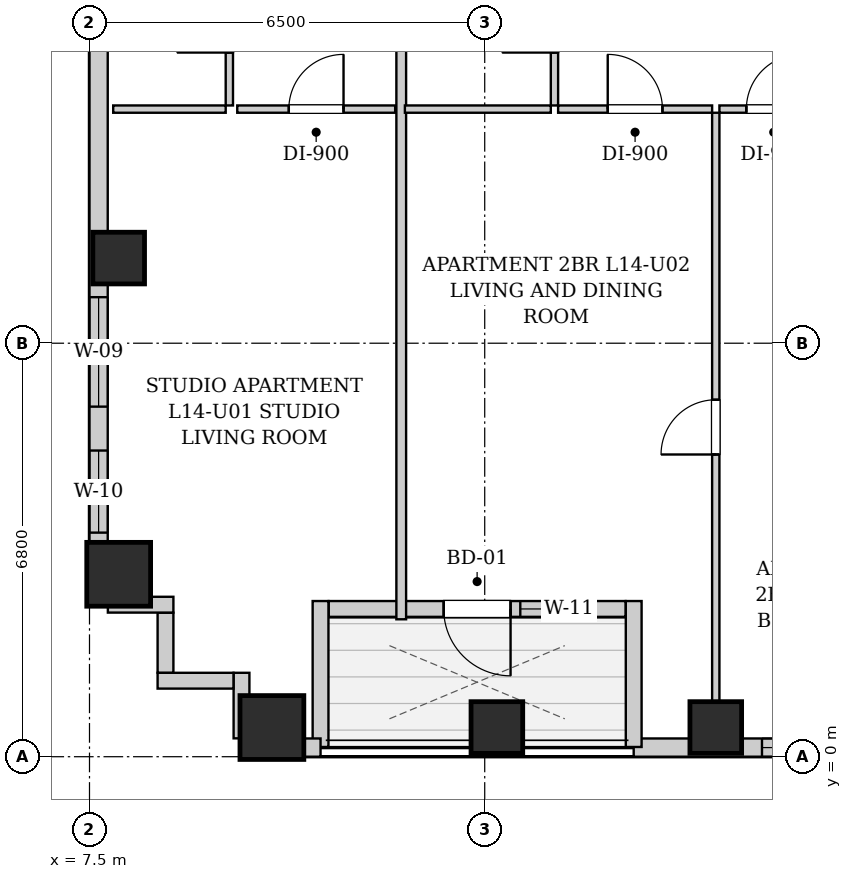
"""IFC4 building model, lengths in metres.
Left out: names, types, materials, properties, quantities, classifications, styles, units other than length and angle.
Written with IfcOpenShell. Run it as: python <this file> out.ifc"""

import sys

from ifc_helpers import new_model, si_unit, direction, frame, frame_2d, origin, origin_2d, place, context, subcontext, project, spatial, rectangle, extrude, element, fill, save


model = new_model("IFC4")
c1 = context("Model", 3, precision=1e-05, world=origin(), true_north=direction((0.0, 1.0)))
c2 = subcontext(c1, "Body", "Model", "MODEL_VIEW")
j1 = project(units=[si_unit("LENGTHUNIT", "METRE"), si_unit("PLANEANGLEUNIT", "RADIAN")], contexts=[c1])
p1 = place(None, origin())
s1 = spatial("IfcSite", under=j1, at=p1, CompositionType="ELEMENT")
p2 = place(p1, origin())
s2 = spatial("IfcBuilding", under=s1, at=p2, CompositionType="ELEMENT")
p3 = place(p2, frame((0.0, 0.0, 54.6)))
s3 = spatial("IfcBuildingStorey", under=s2, at=p3, CompositionType="ELEMENT", Elevation=54.6)
p4 = place(p3, frame((10.5, 0.48, 0.0), z_axis=(0.0, 0.0, 1.0), x_axis=(1.0, 0.0, 0.0)))
e1 = element("IfcColumn", 1, at=p4, inside=s3, PredefinedType="COLUMN", context=c2, shape_type="SweptSolid", body=[
    extrude(rectangle(XDim=1.05, YDim=1.05, at=origin_2d()), origin(), (0.0, 0.0, 1.0), 3.2),
])
for number, where, z_axis, x_axis in (
    (2, (14.2, 0.48, 0.0), (0.0, 0.0, 1.0), (1.0, 0.0, 0.0)),
    (3, (17.8, 0.48, 0.0), (0.0, 0.0, 1.0), (1.0, 0.0, 0.0)),
):
    element("IfcColumn", number, at=place(p3, frame(where, z_axis=z_axis, x_axis=x_axis)), inside=s3, PredefinedType="COLUMN", context=c2, shape_type="SweptSolid", body=[
        extrude(rectangle(XDim=0.85, YDim=0.85, at=origin_2d()), origin(), (0.0, 0.0, 1.0), 3.2),
    ])
p5 = place(p3, frame((7.98, 3.0, 0.0), z_axis=(0.0, 0.0, 1.0), x_axis=(1.0, 0.0, 0.0)))
e4 = element("IfcColumn", 4, at=p5, inside=s3, PredefinedType="COLUMN", context=c2, shape_type="SweptSolid", body=[
    extrude(rectangle(XDim=1.05, YDim=1.05, at=origin_2d()), origin(), (0.0, 0.0, 1.0), 3.2),
])
p6 = place(p3, frame((7.98, 8.2, 0.0), z_axis=(0.0, 0.0, 1.0), x_axis=(1.0, 0.0, 0.0)))
e5 = element("IfcColumn", 5, at=p6, inside=s3, PredefinedType="COLUMN", context=c2, shape_type="SweptSolid", body=[
    extrude(rectangle(XDim=0.85, YDim=0.85, at=origin_2d()), origin(), (0.0, 0.0, 1.0), 3.2),
])
p7 = place(p3, frame((44.0, 0.15, 0.0), z_axis=(0.0, 0.0, 1.0), x_axis=(-1.0, 0.0, 0.0)))
e6 = element("IfcWall", 6, at=p7, inside=s3, PredefinedType="SOLIDWALL", context=c2, shape_type="SweptSolid", body=[
    extrude(rectangle(XDim=27.55, YDim=0.3, at=frame_2d((13.775, 0.0))), origin(), (0.0, 0.0, 1.0), 1.975),
])
p8 = place(p7, frame((23.64, 0.0, 0.55)))
e7 = element("IfcOpeningElement", 7, at=p8, cuts=e6, PredefinedType="OPENING", context=c2, shape_type="SweptSolid", body=[
    extrude(rectangle(XDim=1.8, YDim=1.2, at=frame_2d((0.9, 0.6))), frame((0.0, 0.16, 0.0), z_axis=(0.0, -1.0, 0.0), x_axis=(1.0, 0.0, 0.0)), (0.0, 0.0, 1.0), 0.32),
])
p9 = place(p7, frame((21.5, 0.0, 0.55)))
e8 = element("IfcOpeningElement", 8, at=p9, cuts=e6, PredefinedType="OPENING", context=c2, shape_type="SweptSolid", body=[
    extrude(rectangle(XDim=0.85, YDim=1.2, at=frame_2d((0.425, 0.6))), frame((0.0, 0.16, 0.0), z_axis=(0.0, -1.0, 0.0), x_axis=(1.0, 0.0, 0.0)), (0.0, 0.0, 1.0), 0.32),
])
p10 = place(p7, frame((15.65, 0.0, 0.55)))
e9 = element("IfcOpeningElement", 9, at=p10, cuts=e6, PredefinedType="OPENING", context=c2, shape_type="SweptSolid", body=[
    extrude(rectangle(XDim=0.85, YDim=1.2, at=frame_2d((0.425, 0.6))), frame((0.0, 0.16, 0.0), z_axis=(0.0, -1.0, 0.0), x_axis=(1.0, 0.0, 0.0)), (0.0, 0.0, 1.0), 0.32),
])
p11 = place(p7, frame((12.875, 0.0, 0.55)))
e10 = element("IfcOpeningElement", 10, at=p11, cuts=e6, PredefinedType="OPENING", context=c2, shape_type="SweptSolid", body=[
    extrude(rectangle(XDim=1.8, YDim=1.2, at=frame_2d((0.9, 0.6))), frame((0.0, 0.16, 0.0), z_axis=(0.0, -1.0, 0.0), x_axis=(1.0, 0.0, 0.0)), (0.0, 0.0, 1.0), 0.32),
])
p12 = place(p7, frame((9.365, 0.0, 0.55)))
e11 = element("IfcOpeningElement", 11, at=p12, cuts=e6, PredefinedType="OPENING", context=c2, shape_type="SweptSolid", body=[
    extrude(rectangle(XDim=0.85, YDim=1.2, at=frame_2d((0.425, 0.6))), frame((0.0, 0.16, 0.0), z_axis=(0.0, -1.0, 0.0), x_axis=(1.0, 0.0, 0.0)), (0.0, 0.0, 1.0), 0.32),
])
p13 = place(p7, frame((6.477, 0.0, 0.55)))
e12 = element("IfcOpeningElement", 12, at=p13, cuts=e6, PredefinedType="OPENING", context=c2, shape_type="SweptSolid", body=[
    extrude(rectangle(XDim=1.8, YDim=1.2, at=frame_2d((0.9, 0.6))), frame((0.0, 0.16, 0.0), z_axis=(0.0, -1.0, 0.0), x_axis=(1.0, 0.0, 0.0)), (0.0, 0.0, 1.0), 0.32),
])
p14 = place(p7, frame((2.186, 0.0, 0.55)))
e13 = element("IfcOpeningElement", 13, at=p14, cuts=e6, PredefinedType="OPENING", context=c2, shape_type="SweptSolid", body=[
    extrude(rectangle(XDim=1.8, YDim=1.2, at=frame_2d((0.9, 0.6))), frame((0.0, 0.16, 0.0), z_axis=(0.0, -1.0, 0.0), x_axis=(1.0, 0.0, 0.0)), (0.0, 0.0, 1.0), 0.32),
])
p15 = place(p3, frame((16.45, 0.16, 0.0), z_axis=(0.0, 0.0, 1.0), x_axis=(0.0, 1.0, 0.0)))
e14 = element("IfcWall", 14, at=p15, inside=s3, PredefinedType="SOLIDWALL", context=c2, shape_type="SweptSolid", body=[
    extrude(rectangle(XDim=2.4, YDim=0.26, at=frame_2d((1.2, 0.0))), origin(), (0.0, 0.0, 1.0), 2.94),
])
p16 = place(p3, frame((16.316, 2.43, 0.0), z_axis=(0.0, 0.0, 1.0), x_axis=(-1.0, 0.0, 0.0)))
e15 = element("IfcWall", 15, at=p16, inside=s3, PredefinedType="SOLIDWALL", context=c2, shape_type="SweptSolid", body=[
    extrude(rectangle(XDim=4.882, YDim=0.26, at=frame_2d((2.441, 0.0))), origin(), (0.0, 0.0, 1.0), 2.94),
])
p17 = place(p16, frame((1.891, 0.0, 0.0)))
e16 = element("IfcOpeningElement", 16, at=p17, cuts=e15, PredefinedType="OPENING", context=c2, shape_type="SweptSolid", body=[
    extrude(rectangle(XDim=1.1, YDim=2.0, at=frame_2d((0.55, 1.0))), frame((0.0, 0.14, 0.0), z_axis=(0.0, -1.0, 0.0), x_axis=(1.0, 0.0, 0.0)), (0.0, 0.0, 1.0), 0.28),
])
p18 = place(p16, frame((0.881, 0.0, 0.55)))
e17 = element("IfcOpeningElement", 17, at=p18, cuts=e15, PredefinedType="OPENING", context=c2, shape_type="SweptSolid", body=[
    extrude(rectangle(XDim=0.85, YDim=1.2, at=frame_2d((0.425, 0.6))), frame((0.0, 0.14, 0.0), z_axis=(0.0, -1.0, 0.0), x_axis=(1.0, 0.0, 0.0)), (0.0, 0.0, 1.0), 0.28),
])
p19 = place(p3, frame((11.3, 2.56, 0.0), z_axis=(0.0, 0.0, 1.0), x_axis=(0.0, -1.0, 0.0)))
e18 = element("IfcWall", 18, at=p19, inside=s3, PredefinedType="SOLIDWALL", context=c2, shape_type="SweptSolid", body=[
    extrude(rectangle(XDim=2.4, YDim=0.26, at=frame_2d((1.2, 0.0))), origin(), (0.0, 0.0, 1.0), 2.94),
])
p20 = place(p3, frame((11.3, 0.15, 0.0), z_axis=(0.0, 0.0, 1.0), x_axis=(-1.0, 0.0, 0.0)))
e19 = element("IfcWall", 19, at=p20, inside=s3, PredefinedType="SOLIDWALL", context=c2, shape_type="SweptSolid", body=[
    extrude(rectangle(XDim=1.3, YDim=0.3, at=frame_2d((0.65, 0.0))), origin(), (0.0, 0.0, 1.0), 1.975),
])
p21 = place(p3, frame((7.65, 2.5, 0.0), z_axis=(0.0, 0.0, 1.0), x_axis=(0.0, 1.0, 0.0)))
e20 = element("IfcWall", 20, at=p21, inside=s3, PredefinedType="SOLIDWALL", context=c2, shape_type="SweptSolid", body=[
    extrude(rectangle(XDim=12.7, YDim=0.3, at=frame_2d((6.35, 0.0))), origin(), (0.0, 0.0, 1.0), 1.975),
])
p22 = place(p21, frame((3.257, 0.0, 0.55)))
e21 = element("IfcOpeningElement", 21, at=p22, cuts=e20, PredefinedType="OPENING", context=c2, shape_type="SweptSolid", body=[
    extrude(rectangle(XDim=1.8, YDim=1.2, at=frame_2d((0.9, 0.6))), frame((0.0, 0.16, 0.0), z_axis=(0.0, -1.0, 0.0), x_axis=(1.0, 0.0, 0.0)), (0.0, 0.0, 1.0), 0.32),
])
p23 = place(p21, frame((1.185, 0.0, 0.55)))
e22 = element("IfcOpeningElement", 22, at=p23, cuts=e20, PredefinedType="OPENING", context=c2, shape_type="SweptSolid", body=[
    extrude(rectangle(XDim=1.35, YDim=1.2, at=frame_2d((0.675, 0.6))), frame((0.0, 0.16, 0.0), z_axis=(0.0, -1.0, 0.0), x_axis=(1.0, 0.0, 0.0)), (0.0, 0.0, 1.0), 0.32),
])
p24 = place(p3, frame((10.0, 0.302, 0.0), z_axis=(0.0, 0.0, 1.0), x_axis=(0.0, 1.0, 0.0)))
e23 = element("IfcWall", 23, at=p24, inside=s3, PredefinedType="SOLIDWALL", context=c2, shape_type="SweptSolid", body=[
    extrude(rectangle(XDim=1.078, YDim=0.26, at=frame_2d((0.539, 0.0))), origin(), (0.0, 0.0, 1.0), 2.94),
])
p25 = place(p3, frame((9.868, 1.25, 0.0), z_axis=(0.0, 0.0, 1.0), x_axis=(-1.0, 0.0, 0.0)))
e24 = element("IfcWall", 24, at=p25, inside=s3, PredefinedType="SOLIDWALL", context=c2, shape_type="SweptSolid", body=[
    extrude(rectangle(XDim=1.248, YDim=0.26, at=frame_2d((0.624, 0.0))), origin(), (0.0, 0.0, 1.0), 2.94),
])
p26 = place(p3, frame((8.75, 1.382, 0.0), z_axis=(0.0, 0.0, 1.0), x_axis=(0.0, 1.0, 0.0)))
e25 = element("IfcWall", 25, at=p26, inside=s3, PredefinedType="SOLIDWALL", context=c2, shape_type="SweptSolid", body=[
    extrude(rectangle(XDim=0.986, YDim=0.26, at=frame_2d((0.493, 0.0))), origin(), (0.0, 0.0, 1.0), 2.94),
])
p27 = place(p3, frame((8.88, 2.5, 0.0), z_axis=(0.0, 0.0, 1.0), x_axis=(-1.0, 0.0, 0.0)))
e26 = element("IfcWall", 26, at=p27, inside=s3, PredefinedType="SOLIDWALL", context=c2, shape_type="SweptSolid", body=[
    extrude(rectangle(XDim=1.078, YDim=0.26, at=frame_2d((0.539, 0.0))), origin(), (0.0, 0.0, 1.0), 2.94),
])
p28 = place(p3, frame((9.8, 10.71, 0.0), z_axis=(0.0, 0.0, 1.0), x_axis=(0.0, 1.0, 0.0)))
e27 = element("IfcWall", 27, at=p28, inside=s3, PredefinedType="PARTITIONING", context=c2, shape_type="SweptSolid", body=[
    extrude(rectangle(XDim=2.6, YDim=0.12, at=frame_2d((1.3, 0.0))), origin(), (0.0, 0.0, 1.0), 2.94),
])
p29 = place(p28, frame((0.87, 0.0, 0.0)))
e28 = element("IfcOpeningElement", 28, at=p29, cuts=e27, PredefinedType="OPENING", context=c2, shape_type="SweptSolid", body=[
    extrude(rectangle(XDim=0.86, YDim=2.05, at=frame_2d((0.43, 1.025))), frame((0.0, 0.07, 0.0), z_axis=(0.0, -1.0, 0.0), x_axis=(1.0, 0.0, 0.0)), (0.0, 0.0, 1.0), 0.14),
])
p30 = place(p3, frame((7.89, 10.65, 0.0), z_axis=(0.0, 0.0, 1.0), x_axis=(1.0, 0.0, 0.0)))
e29 = element("IfcWall", 29, at=p30, inside=s3, PredefinedType="PARTITIONING", context=c2, shape_type="SweptSolid", body=[
    extrude(rectangle(XDim=1.85, YDim=0.12, at=frame_2d((0.925, 0.0))), origin(), (0.0, 0.0, 1.0), 2.94),
])
p31 = place(p3, frame((9.93, 10.65, 0.0), z_axis=(0.0, 0.0, 1.0), x_axis=(1.0, 0.0, 0.0)))
e30 = element("IfcWall", 30, at=p31, inside=s3, PredefinedType="PARTITIONING", context=c2, shape_type="SweptSolid", body=[
    extrude(rectangle(XDim=2.597, YDim=0.12, at=frame_2d((1.299, 0.0))), origin(), (0.0, 0.0, 1.0), 2.94),
])
p32 = place(p31, frame((0.848, 0.0, 0.0)))
e31 = element("IfcOpeningElement", 31, at=p32, cuts=e30, PredefinedType="OPENING", context=c2, shape_type="SweptSolid", body=[
    extrude(rectangle(XDim=0.9, YDim=2.05, at=frame_2d((0.45, 1.025))), frame((0.0, 0.07, 0.0), z_axis=(0.0, -1.0, 0.0), x_axis=(1.0, 0.0, 0.0)), (0.0, 0.0, 1.0), 0.14),
])
p33 = place(p3, frame((12.627, 2.26, 0.0), z_axis=(0.0, 0.0, 1.0), x_axis=(0.0, 1.0, 0.0)))
e32 = element("IfcWall", 32, at=p33, inside=s3, PredefinedType="PARTITIONING", context=c2, shape_type="SweptSolid", body=[
    extrude(rectangle(XDim=11.05, YDim=0.16, at=frame_2d((5.525, 0.0))), origin(), (0.0, 0.0, 1.0), 2.94),
])
p34 = place(p3, frame((15.147, 10.71, 0.0), z_axis=(0.0, 0.0, 1.0), x_axis=(0.0, 1.0, 0.0)))
e33 = element("IfcWall", 33, at=p34, inside=s3, PredefinedType="PARTITIONING", context=c2, shape_type="SweptSolid", body=[
    extrude(rectangle(XDim=2.6, YDim=0.12, at=frame_2d((1.3, 0.0))), origin(), (0.0, 0.0, 1.0), 2.94),
])
p35 = place(p34, frame((0.87, 0.0, 0.0)))
e34 = element("IfcOpeningElement", 34, at=p35, cuts=e33, PredefinedType="OPENING", context=c2, shape_type="SweptSolid", body=[
    extrude(rectangle(XDim=0.86, YDim=2.05, at=frame_2d((0.43, 1.025))), frame((0.0, 0.07, 0.0), z_axis=(0.0, -1.0, 0.0), x_axis=(1.0, 0.0, 0.0)), (0.0, 0.0, 1.0), 0.14),
])
p36 = place(p3, frame((12.687, 10.65, 0.0), z_axis=(0.0, 0.0, 1.0), x_axis=(1.0, 0.0, 0.0)))
e35 = element("IfcWall", 35, at=p36, inside=s3, PredefinedType="PARTITIONING", context=c2, shape_type="SweptSolid", body=[
    extrude(rectangle(XDim=2.4, YDim=0.12, at=frame_2d((1.2, 0.0))), origin(), (0.0, 0.0, 1.0), 2.94),
])
p37 = place(p3, frame((15.207, 10.65, 0.0), z_axis=(0.0, 0.0, 1.0), x_axis=(1.0, 0.0, 0.0)))
e36 = element("IfcWall", 36, at=p37, inside=s3, PredefinedType="PARTITIONING", context=c2, shape_type="SweptSolid", body=[
    extrude(rectangle(XDim=2.533, YDim=0.12, at=frame_2d((1.267, 0.0))), origin(), (0.0, 0.0, 1.0), 2.94),
])
p38 = place(p37, frame((0.816, 0.0, 0.0)))
e37 = element("IfcOpeningElement", 37, at=p38, cuts=e36, PredefinedType="OPENING", context=c2, shape_type="SweptSolid", body=[
    extrude(rectangle(XDim=0.9, YDim=2.05, at=frame_2d((0.45, 1.025))), frame((0.0, 0.07, 0.0), z_axis=(0.0, -1.0, 0.0), x_axis=(1.0, 0.0, 0.0)), (0.0, 0.0, 1.0), 0.14),
])
p39 = place(p3, frame((17.86, 10.65, 0.0), z_axis=(0.0, 0.0, 1.0), x_axis=(1.0, 0.0, 0.0)))
e38 = element("IfcWall", 38, at=p39, inside=s3, PredefinedType="PARTITIONING", context=c2, shape_type="SweptSolid", body=[
    extrude(rectangle(XDim=1.787, YDim=0.12, at=frame_2d((0.894, 0.0))), origin(), (0.0, 0.0, 1.0), 2.94),
])
p40 = place(p39, frame((0.443, 0.0, 0.0)))
e39 = element("IfcOpeningElement", 39, at=p40, cuts=e38, PredefinedType="OPENING", context=c2, shape_type="SweptSolid", body=[
    extrude(rectangle(XDim=0.9, YDim=2.05, at=frame_2d((0.45, 1.025))), frame((0.0, 0.07, 0.0), z_axis=(0.0, -1.0, 0.0), x_axis=(1.0, 0.0, 0.0)), (0.0, 0.0, 1.0), 0.14),
])
p41 = place(p3, frame((17.8, 0.28, 0.0), z_axis=(0.0, 0.0, 1.0), x_axis=(0.0, 1.0, 0.0)))
e40 = element("IfcWall", 40, at=p41, inside=s3, PredefinedType="PARTITIONING", context=c2, shape_type="SweptSolid", body=[
    extrude(rectangle(XDim=10.31, YDim=0.12, at=frame_2d((5.155, 0.0))), origin(), (0.0, 0.0, 1.0), 2.232),
])
p42 = place(p41, frame((4.69, 0.0, 0.0)))
e41 = element("IfcOpeningElement", 41, at=p42, cuts=e40, PredefinedType="OPENING", context=c2, shape_type="SweptSolid", body=[
    extrude(rectangle(XDim=0.9, YDim=2.05, at=frame_2d((0.45, 1.025))), frame((0.0, 0.07, 0.0), z_axis=(0.0, -1.0, 0.0), x_axis=(1.0, 0.0, 0.0)), (0.0, 0.0, 1.0), 0.14),
])
p43 = place(p29, origin())
e42 = element("IfcDoor", 42, at=p43, inside=s3, OperationType="SINGLE_SWING_LEFT", PredefinedType="DOOR", context=c2, shape_type="SweptSolid", body=[
    extrude(rectangle(XDim=0.86, YDim=2.05, at=frame_2d((0.43, 1.025))), frame((0.0, 0.025, 0.0), z_axis=(0.0, -1.0, 0.0), x_axis=(1.0, 0.0, 0.0)), (0.0, 0.0, 1.0), 0.05),
])
fill(e28, e42)
p44 = place(p32, origin())
e43 = element("IfcDoor", 43, at=p44, inside=s3, OperationType="SINGLE_SWING_RIGHT", PredefinedType="DOOR", context=c2, shape_type="SweptSolid", body=[
    extrude(rectangle(XDim=0.9, YDim=2.05, at=frame_2d((0.45, 1.025))), frame((0.0, 0.025, 0.0), z_axis=(0.0, -1.0, 0.0), x_axis=(1.0, 0.0, 0.0)), (0.0, 0.0, 1.0), 0.05),
])
fill(e31, e43)
p45 = place(p35, origin())
e44 = element("IfcDoor", 44, at=p45, inside=s3, OperationType="SINGLE_SWING_LEFT", PredefinedType="DOOR", context=c2, shape_type="SweptSolid", body=[
    extrude(rectangle(XDim=0.86, YDim=2.05, at=frame_2d((0.43, 1.025))), frame((0.0, 0.025, 0.0), z_axis=(0.0, -1.0, 0.0), x_axis=(1.0, 0.0, 0.0)), (0.0, 0.0, 1.0), 0.05),
])
fill(e34, e44)
p46 = place(p38, origin())
e45 = element("IfcDoor", 45, at=p46, inside=s3, OperationType="SINGLE_SWING_LEFT", PredefinedType="DOOR", context=c2, shape_type="SweptSolid", body=[
    extrude(rectangle(XDim=0.9, YDim=2.05, at=frame_2d((0.45, 1.025))), frame((0.0, 0.025, 0.0), z_axis=(0.0, -1.0, 0.0), x_axis=(1.0, 0.0, 0.0)), (0.0, 0.0, 1.0), 0.05),
])
fill(e37, e45)
p47 = place(p40, origin())
e46 = element("IfcDoor", 46, at=p47, inside=s3, OperationType="SINGLE_SWING_RIGHT", PredefinedType="DOOR", context=c2, shape_type="SweptSolid", body=[
    extrude(rectangle(XDim=0.9, YDim=2.05, at=frame_2d((0.45, 1.025))), frame((0.0, 0.025, 0.0), z_axis=(0.0, -1.0, 0.0), x_axis=(1.0, 0.0, 0.0)), (0.0, 0.0, 1.0), 0.05),
])
fill(e39, e46)
p48 = place(p42, origin())
e47 = element("IfcDoor", 47, at=p48, inside=s3, OperationType="SINGLE_SWING_LEFT", PredefinedType="DOOR", context=c2, shape_type="SweptSolid", body=[
    extrude(rectangle(XDim=0.9, YDim=2.05, at=frame_2d((0.45, 1.025))), frame((0.0, 0.025, 0.0), z_axis=(0.0, -1.0, 0.0), x_axis=(1.0, 0.0, 0.0)), (0.0, 0.0, 1.0), 0.05),
])
fill(e41, e47)
p49 = place(p17, origin())
e48 = element("IfcDoor", 48, at=p49, inside=s3, OperationType="SINGLE_SWING_LEFT", PredefinedType="DOOR", context=c2, shape_type="SweptSolid", body=[
    extrude(rectangle(XDim=1.1, YDim=2.0, at=frame_2d((0.55, 1.0))), frame((0.0, 0.025, 0.0), z_axis=(0.0, -1.0, 0.0), x_axis=(1.0, 0.0, 0.0)), (0.0, 0.0, 1.0), 0.05),
])
fill(e16, e48)
p50 = place(p22, origin())
e49 = element("IfcWindow", 49, at=p50, inside=s3, PartitioningType="DOUBLE_PANEL_VERTICAL", PredefinedType="WINDOW", context=c2, shape_type="SweptSolid", body=[
    extrude(rectangle(XDim=1.8, YDim=1.2, at=frame_2d((0.9, 0.6))), frame((0.0, 0.03, 0.0), z_axis=(0.0, -1.0, 0.0), x_axis=(1.0, 0.0, 0.0)), (0.0, 0.0, 1.0), 0.06),
])
fill(e21, e49)
p51 = place(p23, origin())
e50 = element("IfcWindow", 50, at=p51, inside=s3, PartitioningType="SINGLE_PANEL", PredefinedType="WINDOW", context=c2, shape_type="SweptSolid", body=[
    extrude(rectangle(XDim=1.35, YDim=1.2, at=frame_2d((0.675, 0.6))), frame((0.0, 0.03, 0.0), z_axis=(0.0, -1.0, 0.0), x_axis=(1.0, 0.0, 0.0)), (0.0, 0.0, 1.0), 0.06),
])
fill(e22, e50)
p52 = place(p18, origin())
e51 = element("IfcWindow", 51, at=p52, inside=s3, PartitioningType="SINGLE_PANEL", PredefinedType="WINDOW", context=c2, shape_type="SweptSolid", body=[
    extrude(rectangle(XDim=0.85, YDim=1.2, at=frame_2d((0.425, 0.6))), frame((0.0, 0.03, 0.0), z_axis=(0.0, -1.0, 0.0), x_axis=(1.0, 0.0, 0.0)), (0.0, 0.0, 1.0), 0.06),
])
fill(e17, e51)
p53 = place(p8, origin())
e52 = element("IfcWindow", 52, at=p53, inside=s3, PartitioningType="DOUBLE_PANEL_VERTICAL", PredefinedType="WINDOW", context=c2, shape_type="SweptSolid", body=[
    extrude(rectangle(XDim=1.8, YDim=1.2, at=frame_2d((0.9, 0.6))), frame((0.0, 0.03, 0.0), z_axis=(0.0, -1.0, 0.0), x_axis=(1.0, 0.0, 0.0)), (0.0, 0.0, 1.0), 0.06),
])
fill(e7, e52)
save(model, sys.argv[1])
